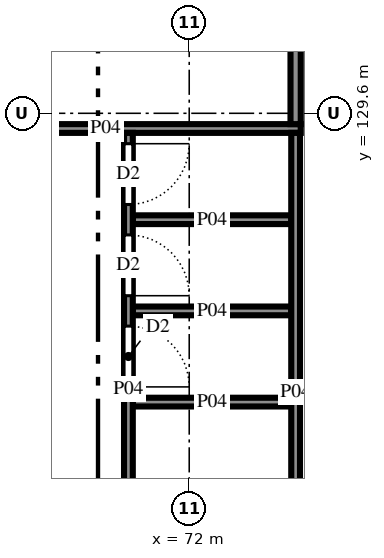
"""IFC4 building model, lengths in metres.
Left out: names, types, materials, properties, quantities, classifications, styles, units other than length and angle.
Written with IfcOpenShell. Run it as: python <this file> out.ifc"""

import sys

from ifc_helpers import new_model, si_unit, direction, frame, frame_2d, origin, place, context, subcontext, project, spatial, rectangle, extrude, element, fill, save


model = new_model("IFC4")
c1 = context("Model", 3, precision=1e-05, world=origin(), true_north=direction((0.0, 1.0)))
c2 = subcontext(c1, "Body", "Model", "MODEL_VIEW")
j1 = project(units=[si_unit("LENGTHUNIT", "METRE"), si_unit("PLANEANGLEUNIT", "RADIAN")], contexts=[c1])
p1 = place(None, origin())
s1 = spatial("IfcSite", under=j1, at=p1, CompositionType="ELEMENT")
p2 = place(p1, origin())
s2 = spatial("IfcBuilding", under=s1, at=p2, CompositionType="ELEMENT")
p3 = place(p2, frame((0.0, 0.0, 7.2)))
s3 = spatial("IfcBuildingStorey", under=s2, at=p3, CompositionType="ELEMENT", Elevation=7.2)
for number, where, z_axis, x_axis in (
    (1, (71.258, 125.8, 0.0), (0.0, 0.0, 1.0), (1.0, 0.0, 0.0)),
    (2, (71.258, 127.0, 0.0), (0.0, 0.0, 1.0), (1.0, 0.0, 0.0)),
    (3, (71.258, 128.2, 0.0), (0.0, 0.0, 1.0), (1.0, 0.0, 0.0)),
):
    element("IfcWall", number, at=place(p3, frame(where, z_axis=z_axis, x_axis=x_axis)), inside=s3, PredefinedType="PARTITIONING", context=c2, shape_type="SweptSolid", body=[
        extrude(rectangle(XDim=2.085, YDim=0.115, at=frame_2d((1.042, 0.0))), origin(), (0.0, 0.0, 1.0), 3.42),
    ])
p4 = place(p3, frame((68.333, 129.4, 0.0), z_axis=(0.0, 0.0, 1.0), x_axis=(1.0, 0.0, 0.0)))
e4 = element("IfcWall", 4, at=p4, inside=s3, PredefinedType="PARTITIONING", context=c2, shape_type="SweptSolid", body=[
    extrude(rectangle(XDim=5.135, YDim=0.115, at=frame_2d((2.567, 0.0))), origin(), (0.0, 0.0, 1.0), 3.42),
])
p5 = place(p3, frame((71.2, 122.59, 0.0), z_axis=(0.0, 0.0, 1.0), x_axis=(0.0, 1.0, 0.0)))
e5 = element("IfcWall", 5, at=p5, inside=s3, PredefinedType="PARTITIONING", context=c2, shape_type="SweptSolid", body=[
    extrude(rectangle(XDim=6.752, YDim=0.115, at=frame_2d((3.376, 0.0))), origin(), (0.0, 0.0, 1.0), 3.42),
])
p6 = place(p5, frame((0.41, 0.0, 0.0)))
e6 = element("IfcOpeningElement", 6, at=p6, cuts=e5, PredefinedType="OPENING", context=c2, shape_type="SweptSolid", body=[
    extrude(rectangle(XDim=1.0, YDim=2.1, at=frame_2d((0.5, 1.05))), frame((0.0, 0.067, 0.0), z_axis=(0.0, -1.0, 0.0), x_axis=(1.0, 0.0, 0.0)), (0.0, 0.0, 1.0), 0.135),
])
p7 = place(p5, frame((2.21, 0.0, 0.0)))
e7 = element("IfcOpeningElement", 7, at=p7, cuts=e5, PredefinedType="OPENING", context=c2, shape_type="SweptSolid", body=[
    extrude(rectangle(XDim=0.8, YDim=2.1, at=frame_2d((0.4, 1.05))), frame((0.0, 0.067, 0.0), z_axis=(0.0, -1.0, 0.0), x_axis=(1.0, 0.0, 0.0)), (0.0, 0.0, 1.0), 0.135),
])
p8 = place(p5, frame((3.41, 0.0, 0.0)))
e8 = element("IfcOpeningElement", 8, at=p8, cuts=e5, PredefinedType="OPENING", context=c2, shape_type="SweptSolid", body=[
    extrude(rectangle(XDim=0.8, YDim=2.1, at=frame_2d((0.4, 1.05))), frame((0.0, 0.067, 0.0), z_axis=(0.0, -1.0, 0.0), x_axis=(1.0, 0.0, 0.0)), (0.0, 0.0, 1.0), 0.135),
])
p9 = place(p5, frame((4.61, 0.0, 0.0)))
e9 = element("IfcOpeningElement", 9, at=p9, cuts=e5, PredefinedType="OPENING", context=c2, shape_type="SweptSolid", body=[
    extrude(rectangle(XDim=0.8, YDim=2.1, at=frame_2d((0.4, 1.05))), frame((0.0, 0.067, 0.0), z_axis=(0.0, -1.0, 0.0), x_axis=(1.0, 0.0, 0.0)), (0.0, 0.0, 1.0), 0.135),
])
p10 = place(p5, frame((5.81, 0.0, 0.0)))
e10 = element("IfcOpeningElement", 10, at=p10, cuts=e5, PredefinedType="OPENING", context=c2, shape_type="SweptSolid", body=[
    extrude(rectangle(XDim=0.8, YDim=2.1, at=frame_2d((0.4, 1.05))), frame((0.0, 0.067, 0.0), z_axis=(0.0, -1.0, 0.0), x_axis=(1.0, 0.0, 0.0)), (0.0, 0.0, 1.0), 0.135),
])
p11 = place(p3, frame((73.4, 122.525, 0.0), z_axis=(0.0, 0.0, 1.0), x_axis=(0.0, 1.0, 0.0)))
e11 = element("IfcWall", 11, at=p11, inside=s3, PredefinedType="PARTITIONING", context=c2, shape_type="SweptSolid", body=[
    extrude(rectangle(XDim=6.818, YDim=0.115, at=frame_2d((3.409, 0.0))), origin(), (0.0, 0.0, 1.0), 3.42),
])
p12 = place(p3, frame((73.4, 129.458, 0.0), z_axis=(0.0, 0.0, 1.0), x_axis=(0.0, 1.0, 0.0)))
e12 = element("IfcWall", 12, at=p12, inside=s3, PredefinedType="PARTITIONING", context=c2, shape_type="SweptSolid", body=[
    extrude(rectangle(XDim=2.475, YDim=0.135, at=frame_2d((1.238, 0.0))), origin(), (0.0, 0.0, 1.0), 3.42),
])
p13 = place(p7, frame((0.8, 0.0, 0.0), z_axis=(0.0, 0.0, 1.0), x_axis=(-1.0, 0.0, 0.0)))
e13 = element("IfcDoor", 13, at=p13, inside=s3, OperationType="SINGLE_SWING_RIGHT", PredefinedType="DOOR", context=c2, shape_type="SweptSolid", body=[
    extrude(rectangle(XDim=0.8, YDim=2.1, at=frame_2d((0.4, 1.05))), frame((0.0, 0.025, 0.0), z_axis=(0.0, -1.0, 0.0), x_axis=(1.0, 0.0, 0.0)), (0.0, 0.0, 1.0), 0.05),
])
fill(e7, e13)
p14 = place(p8, frame((0.8, 0.0, 0.0), z_axis=(0.0, 0.0, 1.0), x_axis=(-1.0, 0.0, 0.0)))
e14 = element("IfcDoor", 14, at=p14, inside=s3, OperationType="SINGLE_SWING_LEFT", PredefinedType="DOOR", context=c2, shape_type="SweptSolid", body=[
    extrude(rectangle(XDim=0.8, YDim=2.1, at=frame_2d((0.4, 1.05))), frame((0.0, 0.025, 0.0), z_axis=(0.0, -1.0, 0.0), x_axis=(1.0, 0.0, 0.0)), (0.0, 0.0, 1.0), 0.05),
])
fill(e8, e14)
p15 = place(p9, frame((0.8, 0.0, 0.0), z_axis=(0.0, 0.0, 1.0), x_axis=(-1.0, 0.0, 0.0)))
e15 = element("IfcDoor", 15, at=p15, inside=s3, OperationType="SINGLE_SWING_LEFT", PredefinedType="DOOR", context=c2, shape_type="SweptSolid", body=[
    extrude(rectangle(XDim=0.8, YDim=2.1, at=frame_2d((0.4, 1.05))), frame((0.0, 0.025, 0.0), z_axis=(0.0, -1.0, 0.0), x_axis=(1.0, 0.0, 0.0)), (0.0, 0.0, 1.0), 0.05),
])
fill(e9, e15)
p16 = place(p10, frame((0.8, 0.0, 0.0), z_axis=(0.0, 0.0, 1.0), x_axis=(-1.0, 0.0, 0.0)))
e16 = element("IfcDoor", 16, at=p16, inside=s3, OperationType="SINGLE_SWING_RIGHT", PredefinedType="DOOR", context=c2, shape_type="SweptSolid", body=[
    extrude(rectangle(XDim=0.8, YDim=2.1, at=frame_2d((0.4, 1.05))), frame((0.0, 0.025, 0.0), z_axis=(0.0, -1.0, 0.0), x_axis=(1.0, 0.0, 0.0)), (0.0, 0.0, 1.0), 0.05),
])
fill(e10, e16)
save(model, sys.argv[1])
